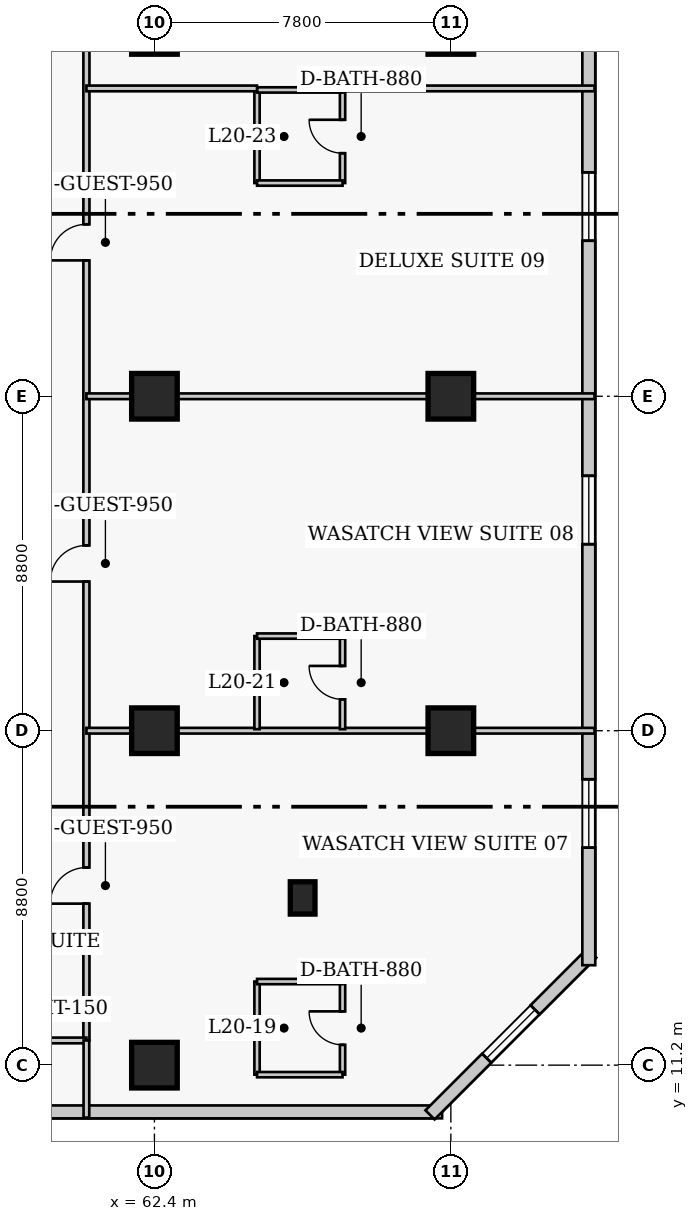
"""IFC4 building model, lengths in metres.
Left out: names, types, materials, properties, quantities, classifications, styles, units other than length and angle.
Written with IfcOpenShell. Run it as: python <this file> out.ifc"""

import sys

from ifc_helpers import new_model, si_unit, direction, frame, frame_2d, origin, origin_2d, place, context, subcontext, project, spatial, rectangle, extrude, element, fill, save


model = new_model("IFC4")
c1 = context("Model", 3, precision=1e-05, world=origin(), true_north=direction((0.0, 1.0)))
c2 = subcontext(c1, "Body", "Model", "MODEL_VIEW")
j1 = project(units=[si_unit("LENGTHUNIT", "METRE"), si_unit("PLANEANGLEUNIT", "RADIAN")], contexts=[c1])
p1 = place(None, origin())
s1 = spatial("IfcSite", under=j1, at=p1, CompositionType="ELEMENT")
p2 = place(p1, origin())
s2 = spatial("IfcBuilding", under=s1, at=p2, CompositionType="ELEMENT")
p3 = place(p2, frame((0.0, 0.0, 84.2)))
s3 = spatial("IfcBuildingStorey", under=s2, at=p3, CompositionType="ELEMENT", Elevation=84.2)
for number, where, z_axis, x_axis in (
    (1, (62.4, 11.2, 0.0), (0.0, 0.0, 1.0), (1.0, 0.0, 0.0)),
    (2, (62.4, 20.0, 0.0), (0.0, 0.0, 1.0), (1.0, 0.0, 0.0)),
    (3, (62.4, 28.8, 0.0), (0.0, 0.0, 1.0), (1.0, 0.0, 0.0)),
    (4, (62.4, 38.4, 0.0), (0.0, 0.0, 1.0), (1.0, 0.0, 0.0)),
    (5, (70.2, 20.0, 0.0), (0.0, 0.0, 1.0), (1.0, 0.0, 0.0)),
    (6, (70.2, 28.8, 0.0), (0.0, 0.0, 1.0), (1.0, 0.0, 0.0)),
    (7, (70.2, 38.4, 0.0), (0.0, 0.0, 1.0), (1.0, 0.0, 0.0)),
):
    element("IfcColumn", number, at=place(p3, frame(where, z_axis=z_axis, x_axis=x_axis)), inside=s3, PredefinedType="COLUMN", context=c2, shape_type="SweptSolid", body=[
        extrude(rectangle(XDim=1.2, YDim=1.2, at=origin_2d()), origin(), (0.0, 0.0, 1.0), 3.8),
    ])
p4 = place(p3, frame((66.3, 15.6, 0.0), z_axis=(0.0, 0.0, 1.0), x_axis=(1.0, 0.0, 0.0)))
e8 = element("IfcColumn", 8, at=p4, inside=s3, PredefinedType="PILASTER", context=c2, shape_type="SweptSolid", body=[
    extrude(rectangle(XDim=0.65, YDim=0.85, at=origin_2d()), origin(), (0.0, 0.0, 1.0), 3.8),
])
p5 = place(p3, frame((41.68, 9.97, 0.0), z_axis=(0.0, 0.0, 1.0), x_axis=(1.0, 0.0, 0.0)))
e9 = element("IfcWall", 9, at=p5, inside=s3, PredefinedType="SOLIDWALL", context=c2, shape_type="SweptSolid", body=[
    extrude(rectangle(XDim=28.29, YDim=0.34, at=frame_2d((14.145, 0.0))), origin(), (0.0, 0.0, 1.0), 3.54),
])
p6 = place(p5, frame((7.57, 0.0, 0.0)))
e10 = element("IfcOpeningElement", 10, at=p6, cuts=e9, PredefinedType="OPENING", context=c2, shape_type="SweptSolid", body=[
    extrude(rectangle(XDim=1.4, YDim=2.15, at=frame_2d((0.7, 1.075))), frame((0.0, 0.18, 0.0), z_axis=(0.0, -1.0, 0.0), x_axis=(1.0, 0.0, 0.0)), (0.0, 0.0, 1.0), 0.36),
])
p7 = place(p5, frame((2.665, 0.0, 0.85)))
e11 = element("IfcOpeningElement", 11, at=p7, cuts=e9, PredefinedType="OPENING", context=c2, shape_type="SweptSolid", body=[
    extrude(rectangle(XDim=1.8, YDim=1.8, at=frame_2d((0.9, 0.9))), frame((0.0, 0.18, 0.0), z_axis=(0.0, -1.0, 0.0), x_axis=(1.0, 0.0, 0.0)), (0.0, 0.0, 1.0), 0.36),
])
p8 = place(p5, frame((13.895, 0.0, 0.85)))
e12 = element("IfcOpeningElement", 12, at=p8, cuts=e9, PredefinedType="OPENING", context=c2, shape_type="SweptSolid", body=[
    extrude(rectangle(XDim=1.8, YDim=1.8, at=frame_2d((0.9, 0.9))), frame((0.0, 0.18, 0.0), z_axis=(0.0, -1.0, 0.0), x_axis=(1.0, 0.0, 0.0)), (0.0, 0.0, 1.0), 0.36),
])
p9 = place(p3, frame((69.652, 9.892, 0.0), z_axis=(0.0, 0.0, 1.0), x_axis=(0.707106781187, 0.707106781187, 0.0)))
e13 = element("IfcWall", 13, at=p9, inside=s3, PredefinedType="SOLIDWALL", context=c2, shape_type="SweptSolid", body=[
    extrude(rectangle(XDim=6.02, YDim=0.34, at=frame_2d((3.01, 0.0))), origin(), (0.0, 0.0, 1.0), 3.54),
])
p10 = place(p9, frame((2.11, 0.0, 0.85)))
e14 = element("IfcOpeningElement", 14, at=p10, cuts=e13, PredefinedType="OPENING", context=c2, shape_type="SweptSolid", body=[
    extrude(rectangle(XDim=1.8, YDim=1.8, at=frame_2d((0.9, 0.9))), frame((0.0, 0.18, 0.0), z_axis=(0.0, -1.0, 0.0), x_axis=(1.0, 0.0, 0.0)), (0.0, 0.0, 1.0), 0.36),
])
p11 = place(p3, frame((73.83, 13.83, 0.0), z_axis=(0.0, 0.0, 1.0), x_axis=(0.0, 1.0, 0.0)))
e15 = element("IfcWall", 15, at=p11, inside=s3, PredefinedType="SOLIDWALL", context=c2, shape_type="SweptSolid", body=[
    extrude(rectangle(XDim=31.94, YDim=0.34, at=frame_2d((15.97, 0.0))), origin(), (0.0, 0.0, 1.0), 3.54),
])
p12 = place(p11, frame((3.093, 0.0, 0.85)))
e16 = element("IfcOpeningElement", 16, at=p12, cuts=e15, PredefinedType="OPENING", context=c2, shape_type="SweptSolid", body=[
    extrude(rectangle(XDim=1.8, YDim=1.8, at=frame_2d((0.9, 0.9))), frame((0.0, 0.18, 0.0), z_axis=(0.0, -1.0, 0.0), x_axis=(1.0, 0.0, 0.0)), (0.0, 0.0, 1.0), 0.36),
])
p13 = place(p11, frame((11.077, 0.0, 0.85)))
e17 = element("IfcOpeningElement", 17, at=p13, cuts=e15, PredefinedType="OPENING", context=c2, shape_type="SweptSolid", body=[
    extrude(rectangle(XDim=1.8, YDim=1.8, at=frame_2d((0.9, 0.9))), frame((0.0, 0.18, 0.0), z_axis=(0.0, -1.0, 0.0), x_axis=(1.0, 0.0, 0.0)), (0.0, 0.0, 1.0), 0.36),
])
p14 = place(p11, frame((19.062, 0.0, 0.85)))
e18 = element("IfcOpeningElement", 18, at=p14, cuts=e15, PredefinedType="OPENING", context=c2, shape_type="SweptSolid", body=[
    extrude(rectangle(XDim=1.8, YDim=1.8, at=frame_2d((0.9, 0.9))), frame((0.0, 0.18, 0.0), z_axis=(0.0, -1.0, 0.0), x_axis=(1.0, 0.0, 0.0)), (0.0, 0.0, 1.0), 0.36),
])
p15 = place(p11, frame((27.048, 0.0, 0.85)))
e19 = element("IfcOpeningElement", 19, at=p15, cuts=e15, PredefinedType="OPENING", context=c2, shape_type="SweptSolid", body=[
    extrude(rectangle(XDim=1.8, YDim=1.8, at=frame_2d((0.9, 0.9))), frame((0.0, 0.18, 0.0), z_axis=(0.0, -1.0, 0.0), x_axis=(1.0, 0.0, 0.0)), (0.0, 0.0, 1.0), 0.36),
])
p16 = place(p3, frame((60.61, 11.85, 0.0), z_axis=(0.0, 0.0, 1.0), x_axis=(0.0, 1.0, 0.0)))
e20 = element("IfcWall", 20, at=p16, inside=s3, PredefinedType="PARTITIONING", context=c2, shape_type="SweptSolid", body=[
    extrude(rectangle(XDim=28.8, YDim=0.16, at=frame_2d((14.4, 0.0))), origin(), (0.0, 0.0, 1.0), 3.54),
])
p17 = place(p16, frame((3.6, 0.0, 0.0)))
e21 = element("IfcOpeningElement", 21, at=p17, cuts=e20, PredefinedType="OPENING", context=c2, shape_type="SweptSolid", body=[
    extrude(rectangle(XDim=0.95, YDim=2.1, at=frame_2d((0.475, 1.05))), frame((0.0, 0.09, 0.0), z_axis=(0.0, -1.0, 0.0), x_axis=(1.0, 0.0, 0.0)), (0.0, 0.0, 1.0), 0.18),
])
p18 = place(p16, frame((12.075, 0.0, 0.0)))
e22 = element("IfcOpeningElement", 22, at=p18, cuts=e20, PredefinedType="OPENING", context=c2, shape_type="SweptSolid", body=[
    extrude(rectangle(XDim=0.95, YDim=2.1, at=frame_2d((0.475, 1.05))), frame((0.0, 0.09, 0.0), z_axis=(0.0, -1.0, 0.0), x_axis=(1.0, 0.0, 0.0)), (0.0, 0.0, 1.0), 0.18),
])
p19 = place(p16, frame((20.525, 0.0, 0.0)))
e23 = element("IfcOpeningElement", 23, at=p19, cuts=e20, PredefinedType="OPENING", context=c2, shape_type="SweptSolid", body=[
    extrude(rectangle(XDim=0.95, YDim=2.1, at=frame_2d((0.475, 1.05))), frame((0.0, 0.09, 0.0), z_axis=(0.0, -1.0, 0.0), x_axis=(1.0, 0.0, 0.0)), (0.0, 0.0, 1.0), 0.18),
])
p20 = place(p16, frame((27.36, 0.0, 0.0)))
e24 = element("IfcOpeningElement", 24, at=p20, cuts=e20, PredefinedType="OPENING", context=c2, shape_type="SweptSolid", body=[
    extrude(rectangle(XDim=1.0, YDim=2.15, at=frame_2d((0.5, 1.075))), frame((0.0, 0.09, 0.0), z_axis=(0.0, -1.0, 0.0), x_axis=(1.0, 0.0, 0.0)), (0.0, 0.0, 1.0), 0.18),
])
p21 = place(p3, frame((58.39, 11.85, 0.0), z_axis=(0.0, 0.0, 1.0), x_axis=(1.0, 0.0, 0.0)))
e25 = element("IfcWall", 25, at=p21, inside=s3, PredefinedType="PARTITIONING", context=c2, shape_type="SweptSolid", body=[
    extrude(rectangle(XDim=2.22, YDim=0.15, at=frame_2d((1.11, 0.0))), origin(), (0.0, 0.0, 1.0), 3.54),
])
p22 = place(p3, frame((60.61, 9.82, 0.0), z_axis=(0.0, 0.0, 1.0), x_axis=(0.0, 1.0, 0.0)))
e26 = element("IfcWall", 26, at=p22, inside=s3, PredefinedType="PARTITIONING", context=c2, shape_type="SweptSolid", body=[
    extrude(rectangle(XDim=2.03, YDim=0.15, at=frame_2d((1.015, 0.0))), origin(), (0.0, 0.0, 1.0), 3.54),
])
p23 = place(p3, frame((65.1, 10.95, 0.0), z_axis=(0.0, 0.0, 1.0), x_axis=(0.0, 1.0, 0.0)))
e27 = element("IfcWall", 27, at=p23, inside=s3, PredefinedType="PLUMBINGWALL", context=c2, shape_type="SweptSolid", body=[
    extrude(rectangle(XDim=2.45, YDim=0.14, at=frame_2d((1.225, 0.0))), origin(), (0.0, 0.0, 1.0), 3.54),
])
p24 = place(p3, frame((67.35, 10.95, 0.0), z_axis=(0.0, 0.0, 1.0), x_axis=(0.0, 1.0, 0.0)))
e28 = element("IfcWall", 28, at=p24, inside=s3, PredefinedType="PLUMBINGWALL", context=c2, shape_type="SweptSolid", body=[
    extrude(rectangle(XDim=2.45, YDim=0.14, at=frame_2d((1.225, 0.0))), origin(), (0.0, 0.0, 1.0), 3.54),
])
p25 = place(p24, frame((0.785, 0.0, 0.0)))
e29 = element("IfcOpeningElement", 29, at=p25, cuts=e28, PredefinedType="OPENING", context=c2, shape_type="SweptSolid", body=[
    extrude(rectangle(XDim=0.88, YDim=2.05, at=frame_2d((0.44, 1.025))), frame((0.0, 0.08, 0.0), z_axis=(0.0, -1.0, 0.0), x_axis=(1.0, 0.0, 0.0)), (0.0, 0.0, 1.0), 0.16),
])
for number, where, z_axis, x_axis in (
    (30, (65.1, 10.95, 0.0), (0.0, 0.0, 1.0), (1.0, 0.0, 0.0)),
    (31, (65.1, 13.4, 0.0), (0.0, 0.0, 1.0), (1.0, 0.0, 0.0)),
):
    element("IfcWall", number, at=place(p3, frame(where, z_axis=z_axis, x_axis=x_axis)), inside=s3, PredefinedType="PLUMBINGWALL", context=c2, shape_type="SweptSolid", body=[
        extrude(rectangle(XDim=2.25, YDim=0.14, at=frame_2d((1.125, 0.0))), origin(), (0.0, 0.0, 1.0), 3.54),
    ])
p26 = place(p3, frame((60.61, 20.0, 0.0), z_axis=(0.0, 0.0, 1.0), x_axis=(1.0, 0.0, 0.0)))
e32 = element("IfcWall", 32, at=p26, inside=s3, PredefinedType="PARTITIONING", context=c2, shape_type="SweptSolid", body=[
    extrude(rectangle(XDim=13.37, YDim=0.15, at=frame_2d((6.685, 0.0))), origin(), (0.0, 0.0, 1.0), 2.679),
])
p27 = place(p3, frame((65.1, 20.04, 0.0), z_axis=(0.0, 0.0, 1.0), x_axis=(0.0, 1.0, 0.0)))
e33 = element("IfcWall", 33, at=p27, inside=s3, PredefinedType="PLUMBINGWALL", context=c2, shape_type="SweptSolid", body=[
    extrude(rectangle(XDim=2.45, YDim=0.14, at=frame_2d((1.225, 0.0))), origin(), (0.0, 0.0, 1.0), 3.54),
])
p28 = place(p3, frame((67.35, 20.04, 0.0), z_axis=(0.0, 0.0, 1.0), x_axis=(0.0, 1.0, 0.0)))
e34 = element("IfcWall", 34, at=p28, inside=s3, PredefinedType="PLUMBINGWALL", context=c2, shape_type="SweptSolid", body=[
    extrude(rectangle(XDim=2.45, YDim=0.14, at=frame_2d((1.225, 0.0))), origin(), (0.0, 0.0, 1.0), 3.54),
])
p29 = place(p28, frame((0.785, 0.0, 0.0)))
e35 = element("IfcOpeningElement", 35, at=p29, cuts=e34, PredefinedType="OPENING", context=c2, shape_type="SweptSolid", body=[
    extrude(rectangle(XDim=0.88, YDim=2.05, at=frame_2d((0.44, 1.025))), frame((0.0, 0.08, 0.0), z_axis=(0.0, -1.0, 0.0), x_axis=(1.0, 0.0, 0.0)), (0.0, 0.0, 1.0), 0.16),
])
p30 = place(p3, frame((65.1, 22.49, 0.0), z_axis=(0.0, 0.0, 1.0), x_axis=(1.0, 0.0, 0.0)))
e36 = element("IfcWall", 36, at=p30, inside=s3, PredefinedType="PLUMBINGWALL", context=c2, shape_type="SweptSolid", body=[
    extrude(rectangle(XDim=2.25, YDim=0.14, at=frame_2d((1.125, 0.0))), origin(), (0.0, 0.0, 1.0), 3.54),
])
p31 = place(p3, frame((60.61, 28.8, 0.0), z_axis=(0.0, 0.0, 1.0), x_axis=(1.0, 0.0, 0.0)))
e37 = element("IfcWall", 37, at=p31, inside=s3, PredefinedType="PARTITIONING", context=c2, shape_type="SweptSolid", body=[
    extrude(rectangle(XDim=13.37, YDim=0.15, at=frame_2d((6.685, 0.0))), origin(), (0.0, 0.0, 1.0), 2.679),
])
p32 = place(p3, frame((65.1, 34.41, 0.0), z_axis=(0.0, 0.0, 1.0), x_axis=(0.0, 1.0, 0.0)))
e38 = element("IfcWall", 38, at=p32, inside=s3, PredefinedType="PLUMBINGWALL", context=c2, shape_type="SweptSolid", body=[
    extrude(rectangle(XDim=2.45, YDim=0.14, at=frame_2d((1.225, 0.0))), origin(), (0.0, 0.0, 1.0), 3.54),
])
p33 = place(p3, frame((67.35, 34.41, 0.0), z_axis=(0.0, 0.0, 1.0), x_axis=(0.0, 1.0, 0.0)))
e39 = element("IfcWall", 39, at=p33, inside=s3, PredefinedType="PLUMBINGWALL", context=c2, shape_type="SweptSolid", body=[
    extrude(rectangle(XDim=2.45, YDim=0.14, at=frame_2d((1.225, 0.0))), origin(), (0.0, 0.0, 1.0), 3.54),
])
p34 = place(p33, frame((0.785, 0.0, 0.0)))
e40 = element("IfcOpeningElement", 40, at=p34, cuts=e39, PredefinedType="OPENING", context=c2, shape_type="SweptSolid", body=[
    extrude(rectangle(XDim=0.88, YDim=2.05, at=frame_2d((0.44, 1.025))), frame((0.0, 0.08, 0.0), z_axis=(0.0, -1.0, 0.0), x_axis=(1.0, 0.0, 0.0)), (0.0, 0.0, 1.0), 0.16),
])
for number, where, z_axis, x_axis in (
    (41, (65.1, 34.41, 0.0), (0.0, 0.0, 1.0), (1.0, 0.0, 0.0)),
    (42, (65.1, 36.86, 0.0), (0.0, 0.0, 1.0), (1.0, 0.0, 0.0)),
):
    element("IfcWall", number, at=place(p3, frame(where, z_axis=z_axis, x_axis=x_axis)), inside=s3, PredefinedType="PLUMBINGWALL", context=c2, shape_type="SweptSolid", body=[
        extrude(rectangle(XDim=2.25, YDim=0.14, at=frame_2d((1.125, 0.0))), origin(), (0.0, 0.0, 1.0), 3.54),
    ])
p35 = place(p3, frame((60.61, 36.9, 0.0), z_axis=(0.0, 0.0, 1.0), x_axis=(1.0, 0.0, 0.0)))
e43 = element("IfcWall", 43, at=p35, inside=s3, PredefinedType="PARTITIONING", context=c2, shape_type="SweptSolid", body=[
    extrude(rectangle(XDim=4.49, YDim=0.15, at=frame_2d((2.245, 0.0))), origin(), (0.0, 0.0, 1.0), 3.54),
])
p36 = place(p3, frame((67.35, 36.9, 0.0), z_axis=(0.0, 0.0, 1.0), x_axis=(1.0, 0.0, 0.0)))
e44 = element("IfcWall", 44, at=p36, inside=s3, PredefinedType="PARTITIONING", context=c2, shape_type="SweptSolid", body=[
    extrude(rectangle(XDim=6.63, YDim=0.15, at=frame_2d((3.315, 0.0))), origin(), (0.0, 0.0, 1.0), 3.54),
])
p37 = place(p10, origin())
e45 = element("IfcWindow", 45, at=p37, inside=s3, PartitioningType="SINGLE_PANEL", PredefinedType="WINDOW", context=c2, shape_type="SweptSolid", body=[
    extrude(rectangle(XDim=1.8, YDim=1.8, at=frame_2d((0.9, 0.9))), frame((0.0, 0.03, 0.0), z_axis=(0.0, -1.0, 0.0), x_axis=(1.0, 0.0, 0.0)), (0.0, 0.0, 1.0), 0.06),
])
fill(e14, e45)
p38 = place(p12, origin())
e46 = element("IfcWindow", 46, at=p38, inside=s3, PartitioningType="SINGLE_PANEL", PredefinedType="WINDOW", context=c2, shape_type="SweptSolid", body=[
    extrude(rectangle(XDim=1.8, YDim=1.8, at=frame_2d((0.9, 0.9))), frame((0.0, 0.03, 0.0), z_axis=(0.0, -1.0, 0.0), x_axis=(1.0, 0.0, 0.0)), (0.0, 0.0, 1.0), 0.06),
])
fill(e16, e46)
p39 = place(p13, origin())
e47 = element("IfcWindow", 47, at=p39, inside=s3, PartitioningType="SINGLE_PANEL", PredefinedType="WINDOW", context=c2, shape_type="SweptSolid", body=[
    extrude(rectangle(XDim=1.8, YDim=1.8, at=frame_2d((0.9, 0.9))), frame((0.0, 0.03, 0.0), z_axis=(0.0, -1.0, 0.0), x_axis=(1.0, 0.0, 0.0)), (0.0, 0.0, 1.0), 0.06),
])
fill(e17, e47)
p40 = place(p14, origin())
e48 = element("IfcWindow", 48, at=p40, inside=s3, PartitioningType="SINGLE_PANEL", PredefinedType="WINDOW", context=c2, shape_type="SweptSolid", body=[
    extrude(rectangle(XDim=1.8, YDim=1.8, at=frame_2d((0.9, 0.9))), frame((0.0, 0.03, 0.0), z_axis=(0.0, -1.0, 0.0), x_axis=(1.0, 0.0, 0.0)), (0.0, 0.0, 1.0), 0.06),
])
fill(e18, e48)
p41 = place(p25, origin())
e49 = element("IfcDoor", 49, at=p41, inside=s3, OperationType="SINGLE_SWING_RIGHT", PredefinedType="DOOR", context=c2, shape_type="SweptSolid", body=[
    extrude(rectangle(XDim=0.88, YDim=2.05, at=frame_2d((0.44, 1.025))), frame((0.0, 0.025, 0.0), z_axis=(0.0, -1.0, 0.0), x_axis=(1.0, 0.0, 0.0)), (0.0, 0.0, 1.0), 0.05),
])
fill(e29, e49)
p42 = place(p17, origin())
e50 = element("IfcDoor", 50, at=p42, inside=s3, OperationType="SINGLE_SWING_LEFT", PredefinedType="DOOR", context=c2, shape_type="SweptSolid", body=[
    extrude(rectangle(XDim=0.95, YDim=2.1, at=frame_2d((0.475, 1.05))), frame((0.0, 0.025, 0.0), z_axis=(0.0, -1.0, 0.0), x_axis=(1.0, 0.0, 0.0)), (0.0, 0.0, 1.0), 0.05),
])
fill(e21, e50)
p43 = place(p29, origin())
e51 = element("IfcDoor", 51, at=p43, inside=s3, OperationType="SINGLE_SWING_RIGHT", PredefinedType="DOOR", context=c2, shape_type="SweptSolid", body=[
    extrude(rectangle(XDim=0.88, YDim=2.05, at=frame_2d((0.44, 1.025))), frame((0.0, 0.025, 0.0), z_axis=(0.0, -1.0, 0.0), x_axis=(1.0, 0.0, 0.0)), (0.0, 0.0, 1.0), 0.05),
])
fill(e35, e51)
p44 = place(p18, origin())
e52 = element("IfcDoor", 52, at=p44, inside=s3, OperationType="SINGLE_SWING_LEFT", PredefinedType="DOOR", context=c2, shape_type="SweptSolid", body=[
    extrude(rectangle(XDim=0.95, YDim=2.1, at=frame_2d((0.475, 1.05))), frame((0.0, 0.025, 0.0), z_axis=(0.0, -1.0, 0.0), x_axis=(1.0, 0.0, 0.0)), (0.0, 0.0, 1.0), 0.05),
])
fill(e22, e52)
p45 = place(p34, origin())
e53 = element("IfcDoor", 53, at=p45, inside=s3, OperationType="SINGLE_SWING_RIGHT", PredefinedType="DOOR", context=c2, shape_type="SweptSolid", body=[
    extrude(rectangle(XDim=0.88, YDim=2.05, at=frame_2d((0.44, 1.025))), frame((0.0, 0.025, 0.0), z_axis=(0.0, -1.0, 0.0), x_axis=(1.0, 0.0, 0.0)), (0.0, 0.0, 1.0), 0.05),
])
fill(e40, e53)
p46 = place(p19, origin())
e54 = element("IfcDoor", 54, at=p46, inside=s3, OperationType="SINGLE_SWING_LEFT", PredefinedType="DOOR", context=c2, shape_type="SweptSolid", body=[
    extrude(rectangle(XDim=0.95, YDim=2.1, at=frame_2d((0.475, 1.05))), frame((0.0, 0.025, 0.0), z_axis=(0.0, -1.0, 0.0), x_axis=(1.0, 0.0, 0.0)), (0.0, 0.0, 1.0), 0.05),
])
fill(e23, e54)
save(model, sys.argv[1])
